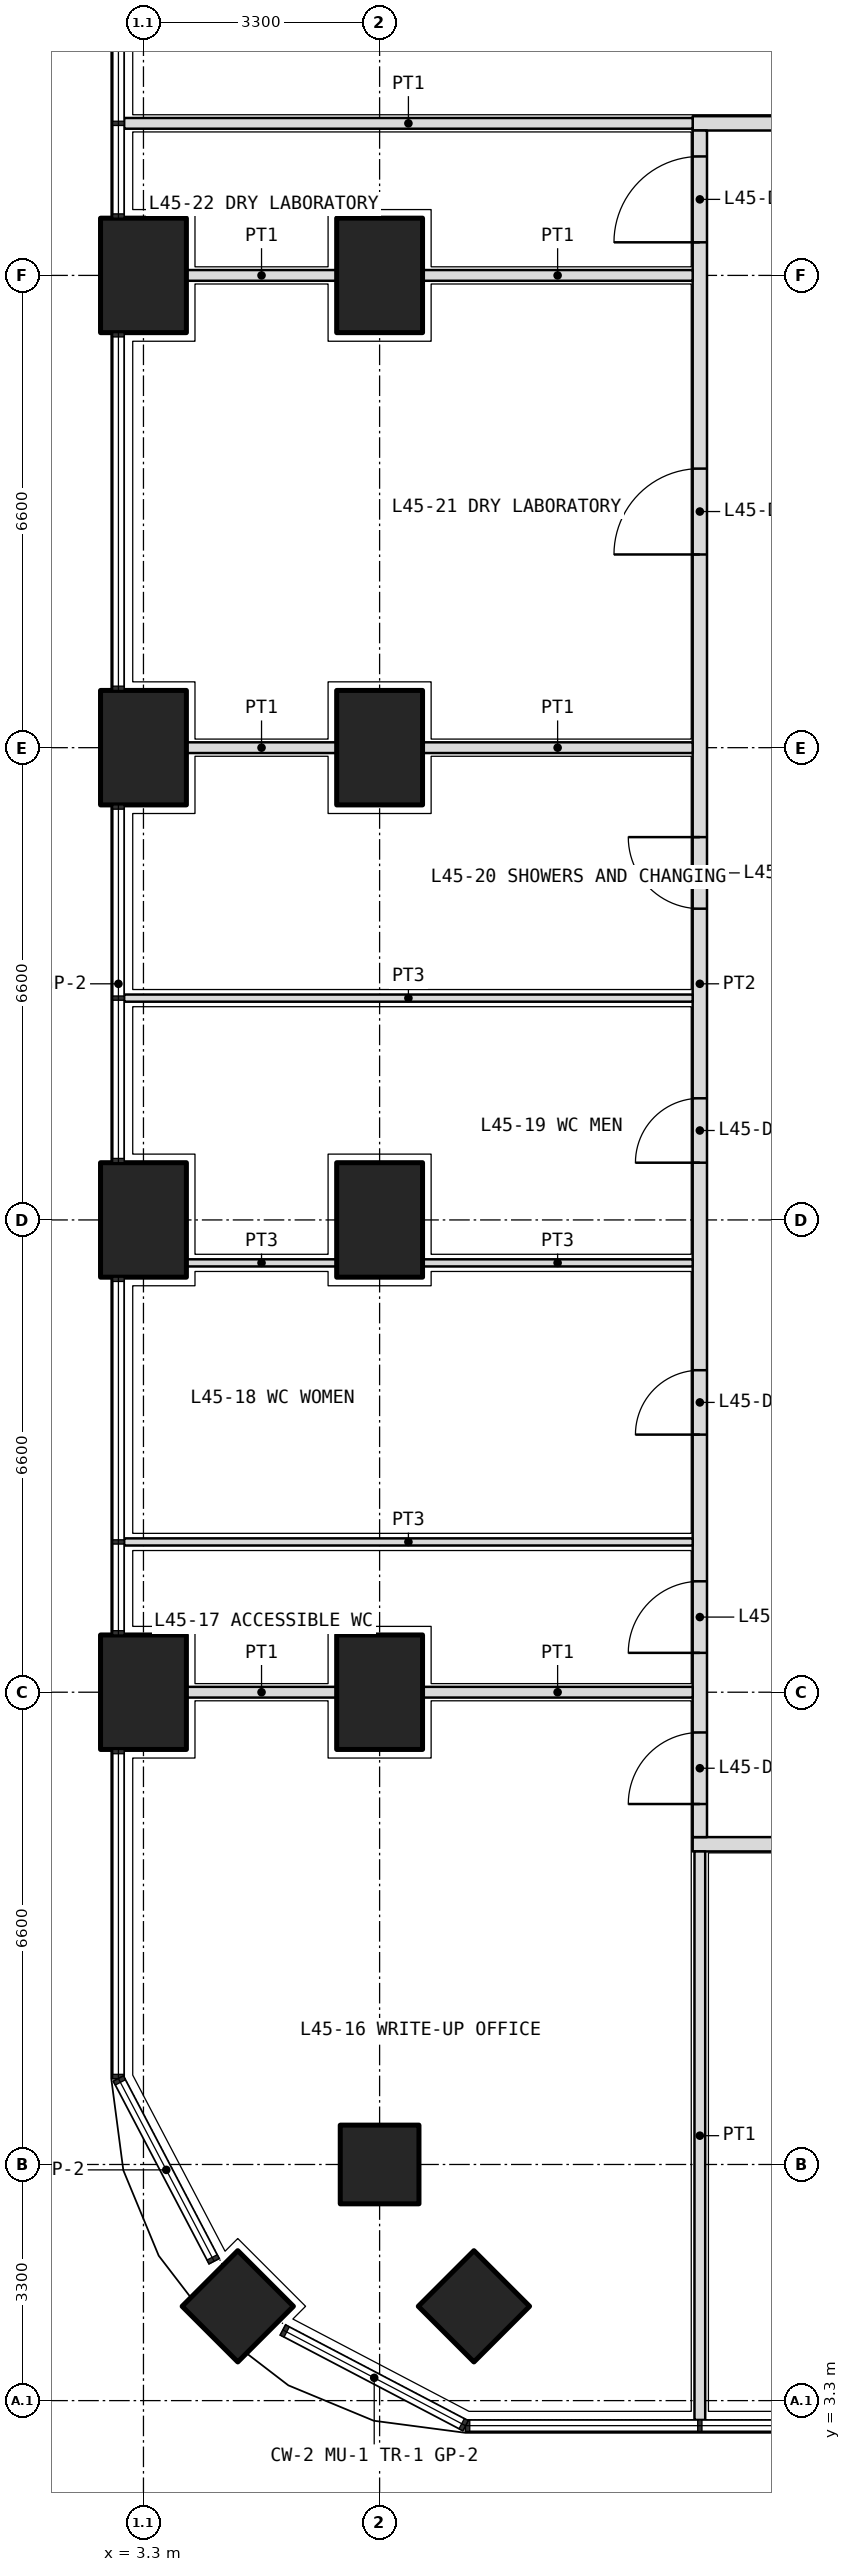
"""IFC4 building model, lengths in metres.
Left out: names, types, materials, properties, quantities, classifications, styles, units other than length and angle.
Written with IfcOpenShell. Run it as: python <this file> out.ifc"""

import sys

from ifc_helpers import new_model, si_unit, direction, frame, frame_2d, origin, origin_2d, place, context, subcontext, project, spatial, rectangle, extrude, element, fill, save


model = new_model("IFC4")
c1 = context("Model", 3, precision=1e-05, world=origin(), true_north=direction((0.0, 1.0)))
c2 = subcontext(c1, "Body", "Model", "MODEL_VIEW")
j1 = project(units=[si_unit("LENGTHUNIT", "METRE"), si_unit("PLANEANGLEUNIT", "RADIAN")], contexts=[c1])
p1 = place(None, origin())
s1 = spatial("IfcSite", under=j1, at=p1, CompositionType="ELEMENT")
p2 = place(p1, origin())
s2 = spatial("IfcBuilding", under=s1, at=p2, CompositionType="ELEMENT")
p3 = place(p2, frame((0.0, 0.0, 197.7)))
s3 = spatial("IfcBuildingStorey", under=s2, at=p3, CompositionType="ELEMENT", Elevation=197.7)
p4 = place(p3, frame((4.618, 4.618, 0.0), z_axis=(0.0, 0.0, 1.0), x_axis=(0.707106781187, 0.707106781187, 0.0)))
e1 = element("IfcColumn", 1, at=p4, inside=s3, PredefinedType="COLUMN", context=c2, shape_type="SweptSolid", body=[
    extrude(rectangle(XDim=1.1, YDim=1.1, at=origin_2d()), origin(), (0.0, 0.0, 1.0), 4.2),
])
for number, where, z_axis, x_axis in (
    (2, (3.3, 13.2, 0.0), (0.0, 0.0, 1.0), (0.0, 1.0, 0.0)),
    (3, (3.3, 19.8, 0.0), (0.0, 0.0, 1.0), (0.0, 1.0, 0.0)),
    (4, (3.3, 26.4, 0.0), (0.0, 0.0, 1.0), (0.0, 1.0, 0.0)),
    (5, (3.3, 33.0, 0.0), (0.0, 0.0, 1.0), (0.0, 1.0, 0.0)),
):
    element("IfcColumn", number, at=place(p3, frame(where, z_axis=z_axis, x_axis=x_axis)), inside=s3, PredefinedType="COLUMN", context=c2, shape_type="SweptSolid", body=[
        extrude(rectangle(XDim=1.6, YDim=1.2, at=origin_2d()), origin(), (0.0, 0.0, 1.0), 4.2),
    ])
for number, where, z_axis, x_axis in (
    (6, (6.6, 6.6, 0.0), (0.0, 0.0, 1.0), (1.0, 0.0, 0.0)),
    (7, (7.918, 4.618, 0.0), (0.0, 0.0, 1.0), (0.707, 0.707, 0.0)),
):
    element("IfcColumn", number, at=place(p3, frame(where, z_axis=z_axis, x_axis=x_axis)), inside=s3, PredefinedType="COLUMN", context=c2, shape_type="SweptSolid", body=[
        extrude(rectangle(XDim=1.1, YDim=1.1, at=origin_2d()), origin(), (0.0, 0.0, 1.0), 4.2),
    ])
for number, where, z_axis, x_axis in (
    (8, (6.6, 13.2, 0.0), (0.0, 0.0, 1.0), (0.0, 1.0, 0.0)),
    (9, (6.6, 19.8, 0.0), (0.0, 0.0, 1.0), (0.0, 1.0, 0.0)),
    (10, (6.6, 26.4, 0.0), (0.0, 0.0, 1.0), (0.0, 1.0, 0.0)),
    (11, (6.6, 33.0, 0.0), (0.0, 0.0, 1.0), (0.0, 1.0, 0.0)),
):
    element("IfcColumn", number, at=place(p3, frame(where, z_axis=z_axis, x_axis=x_axis)), inside=s3, PredefinedType="COLUMN", context=c2, shape_type="SweptSolid", body=[
        extrude(rectangle(XDim=1.6, YDim=1.2, at=origin_2d()), origin(), (0.0, 0.0, 1.0), 4.2),
    ])
p5 = place(p3, frame((10.975, 11.075, 0.0), z_axis=(0.0, 0.0, 1.0), x_axis=(1.0, 0.0, 0.0)))
e12 = element("IfcWall", 12, at=p5, inside=s3, PredefinedType="PARTITIONING", context=c2, shape_type="SweptSolid", body=[
    extrude(rectangle(XDim=30.85, YDim=0.2, at=frame_2d((15.425, 0.0))), origin(), (0.0, 0.0, 1.0), 2.85),
])
p6 = place(p5, frame((5.512, 0.0, 0.0)))
e13 = element("IfcOpeningElement", 13, at=p6, cuts=e12, PredefinedType="OPENING", context=c2, shape_type="SweptSolid", body=[
    extrude(rectangle(XDim=1.2, YDim=2.1, at=frame_2d((0.6, 1.05))), frame((0.0, 0.11, 0.0), z_axis=(0.0, -1.0, 0.0), x_axis=(1.0, 0.0, 0.0)), (0.0, 0.0, 1.0), 0.22),
])
p7 = place(p5, frame((13.375, 0.0, 0.0)))
e14 = element("IfcOpeningElement", 14, at=p7, cuts=e12, PredefinedType="OPENING", context=c2, shape_type="SweptSolid", body=[
    extrude(rectangle(XDim=1.0, YDim=2.1, at=frame_2d((0.5, 1.05))), frame((0.0, 0.11, 0.0), z_axis=(0.0, -1.0, 0.0), x_axis=(1.0, 0.0, 0.0)), (0.0, 0.0, 1.0), 0.22),
])
p8 = place(p5, frame((16.675, 0.0, 0.0)))
e15 = element("IfcOpeningElement", 15, at=p8, cuts=e12, PredefinedType="OPENING", context=c2, shape_type="SweptSolid", body=[
    extrude(rectangle(XDim=1.0, YDim=2.1, at=frame_2d((0.5, 1.05))), frame((0.0, 0.11, 0.0), z_axis=(0.0, -1.0, 0.0), x_axis=(1.0, 0.0, 0.0)), (0.0, 0.0, 1.0), 0.22),
])
p9 = place(p5, frame((24.238, 0.0, 0.0)))
e16 = element("IfcOpeningElement", 16, at=p9, cuts=e12, PredefinedType="OPENING", context=c2, shape_type="SweptSolid", body=[
    extrude(rectangle(XDim=1.0, YDim=2.1, at=frame_2d((0.5, 1.05))), frame((0.0, 0.11, 0.0), z_axis=(0.0, -1.0, 0.0), x_axis=(1.0, 0.0, 0.0)), (0.0, 0.0, 1.0), 0.22),
])
p10 = place(p3, frame((10.975, 35.125, 0.0), z_axis=(0.0, 0.0, 1.0), x_axis=(1.0, 0.0, 0.0)))
e17 = element("IfcWall", 17, at=p10, inside=s3, PredefinedType="PARTITIONING", context=c2, shape_type="SweptSolid", body=[
    extrude(rectangle(XDim=30.85, YDim=0.2, at=frame_2d((15.425, 0.0))), origin(), (0.0, 0.0, 1.0), 2.85),
])
p11 = place(p10, frame((2.212, 0.0, 0.0)))
e18 = element("IfcOpeningElement", 18, at=p11, cuts=e17, PredefinedType="OPENING", context=c2, shape_type="SweptSolid", body=[
    extrude(rectangle(XDim=1.2, YDim=2.1, at=frame_2d((0.6, 1.05))), frame((0.0, 0.11, 0.0), z_axis=(0.0, -1.0, 0.0), x_axis=(1.0, 0.0, 0.0)), (0.0, 0.0, 1.0), 0.22),
])
p12 = place(p10, frame((6.675, 0.0, 0.0)))
e19 = element("IfcOpeningElement", 19, at=p12, cuts=e17, PredefinedType="OPENING", context=c2, shape_type="SweptSolid", body=[
    extrude(rectangle(XDim=1.0, YDim=2.1, at=frame_2d((0.5, 1.05))), frame((0.0, 0.11, 0.0), z_axis=(0.0, -1.0, 0.0), x_axis=(1.0, 0.0, 0.0)), (0.0, 0.0, 1.0), 0.22),
])
p13 = place(p10, frame((14.925, 0.0, 0.0)))
e20 = element("IfcOpeningElement", 20, at=p13, cuts=e17, PredefinedType="OPENING", context=c2, shape_type="SweptSolid", body=[
    extrude(rectangle(XDim=1.0, YDim=2.1, at=frame_2d((0.5, 1.05))), frame((0.0, 0.11, 0.0), z_axis=(0.0, -1.0, 0.0), x_axis=(1.0, 0.0, 0.0)), (0.0, 0.0, 1.0), 0.22),
])
p14 = place(p10, frame((25.788, 0.0, 0.0)))
e21 = element("IfcOpeningElement", 21, at=p14, cuts=e17, PredefinedType="OPENING", context=c2, shape_type="SweptSolid", body=[
    extrude(rectangle(XDim=1.2, YDim=2.1, at=frame_2d((0.6, 1.05))), frame((0.0, 0.11, 0.0), z_axis=(0.0, -1.0, 0.0), x_axis=(1.0, 0.0, 0.0)), (0.0, 0.0, 1.0), 0.22),
])
p15 = place(p3, frame((11.075, 11.175, 0.0), z_axis=(0.0, 0.0, 1.0), x_axis=(0.0, 1.0, 0.0)))
e22 = element("IfcWall", 22, at=p15, inside=s3, PredefinedType="PARTITIONING", context=c2, shape_type="SweptSolid", body=[
    extrude(rectangle(XDim=23.85, YDim=0.2, at=frame_2d((11.925, 0.0))), origin(), (0.0, 0.0, 1.0), 2.85),
])
p16 = place(p15, frame((0.462, 0.0, 0.0)))
e23 = element("IfcOpeningElement", 23, at=p16, cuts=e22, PredefinedType="OPENING", context=c2, shape_type="SweptSolid", body=[
    extrude(rectangle(XDim=1.0, YDim=2.1, at=frame_2d((0.5, 1.05))), frame((0.0, 0.11, 0.0), z_axis=(0.0, -1.0, 0.0), x_axis=(1.0, 0.0, 0.0)), (0.0, 0.0, 1.0), 0.22),
])
p17 = place(p15, frame((2.575, 0.0, 0.0)))
e24 = element("IfcOpeningElement", 24, at=p17, cuts=e22, PredefinedType="OPENING", context=c2, shape_type="SweptSolid", body=[
    extrude(rectangle(XDim=1.0, YDim=2.1, at=frame_2d((0.5, 1.05))), frame((0.0, 0.11, 0.0), z_axis=(0.0, -1.0, 0.0), x_axis=(1.0, 0.0, 0.0)), (0.0, 0.0, 1.0), 0.22),
])
p18 = place(p15, frame((5.625, 0.0, 0.0)))
e25 = element("IfcOpeningElement", 25, at=p18, cuts=e22, PredefinedType="OPENING", context=c2, shape_type="SweptSolid", body=[
    extrude(rectangle(XDim=0.9, YDim=2.1, at=frame_2d((0.45, 1.05))), frame((0.0, 0.11, 0.0), z_axis=(0.0, -1.0, 0.0), x_axis=(1.0, 0.0, 0.0)), (0.0, 0.0, 1.0), 0.22),
])
p19 = place(p15, frame((9.425, 0.0, 0.0)))
e26 = element("IfcOpeningElement", 26, at=p19, cuts=e22, PredefinedType="OPENING", context=c2, shape_type="SweptSolid", body=[
    extrude(rectangle(XDim=0.9, YDim=2.1, at=frame_2d((0.45, 1.05))), frame((0.0, 0.11, 0.0), z_axis=(0.0, -1.0, 0.0), x_axis=(1.0, 0.0, 0.0)), (0.0, 0.0, 1.0), 0.22),
])
p20 = place(p15, frame((12.975, 0.0, 0.0)))
e27 = element("IfcOpeningElement", 27, at=p20, cuts=e22, PredefinedType="OPENING", context=c2, shape_type="SweptSolid", body=[
    extrude(rectangle(XDim=1.0, YDim=2.1, at=frame_2d((0.5, 1.05))), frame((0.0, 0.11, 0.0), z_axis=(0.0, -1.0, 0.0), x_axis=(1.0, 0.0, 0.0)), (0.0, 0.0, 1.0), 0.22),
])
p21 = place(p15, frame((17.925, 0.0, 0.0)))
e28 = element("IfcOpeningElement", 28, at=p21, cuts=e22, PredefinedType="OPENING", context=c2, shape_type="SweptSolid", body=[
    extrude(rectangle(XDim=1.2, YDim=2.1, at=frame_2d((0.6, 1.05))), frame((0.0, 0.11, 0.0), z_axis=(0.0, -1.0, 0.0), x_axis=(1.0, 0.0, 0.0)), (0.0, 0.0, 1.0), 0.22),
])
p22 = place(p15, frame((22.288, 0.0, 0.0)))
e29 = element("IfcOpeningElement", 29, at=p22, cuts=e22, PredefinedType="OPENING", context=c2, shape_type="SweptSolid", body=[
    extrude(rectangle(XDim=1.2, YDim=2.1, at=frame_2d((0.6, 1.05))), frame((0.0, 0.11, 0.0), z_axis=(0.0, -1.0, 0.0), x_axis=(1.0, 0.0, 0.0)), (0.0, 0.0, 1.0), 0.22),
])
for number, where, z_axis, x_axis in (
    (30, (11.075, 3.03, 0.0), (0.0, 0.0, 1.0), (0.0, 1.0, 0.0)),
    (31, (3.03, 35.125, 0.0), (0.0, 0.0, 1.0), (1.0, 0.0, 0.0)),
):
    element("IfcWall", number, at=place(p3, frame(where, z_axis=z_axis, x_axis=x_axis)), inside=s3, PredefinedType="PARTITIONING", context=c2, shape_type="SweptSolid", body=[
        extrude(rectangle(XDim=7.945, YDim=0.15, at=frame_2d((3.973, 0.0))), origin(), (0.0, 0.0, 1.0), 2.7),
    ])
p23 = place(p3, frame((3.03, 15.3, 0.0), z_axis=(0.0, 0.0, 1.0), x_axis=(1.0, 0.0, 0.0)))
e32 = element("IfcWall", 32, at=p23, inside=s3, PredefinedType="PARTITIONING", context=c2, shape_type="SweptSolid", body=[
    extrude(rectangle(XDim=7.945, YDim=0.1, at=frame_2d((3.973, 0.0))), origin(), (0.0, 0.0, 1.0), 2.7),
])
p24 = place(p3, frame((3.9, 19.2, 0.0), z_axis=(0.0, 0.0, 1.0), x_axis=(1.0, 0.0, 0.0)))
e33 = element("IfcWall", 33, at=p24, inside=s3, PredefinedType="PARTITIONING", context=c2, shape_type="SweptSolid", body=[
    extrude(rectangle(XDim=2.1, YDim=0.1, at=frame_2d((1.05, 0.0))), origin(), (0.0, 0.0, 1.0), 2.85),
])
p25 = place(p3, frame((7.2, 19.2, 0.0), z_axis=(0.0, 0.0, 1.0), x_axis=(1.0, 0.0, 0.0)))
e34 = element("IfcWall", 34, at=p25, inside=s3, PredefinedType="PARTITIONING", context=c2, shape_type="SweptSolid", body=[
    extrude(rectangle(XDim=3.775, YDim=0.1, at=frame_2d((1.888, 0.0))), origin(), (0.0, 0.0, 1.0), 2.85),
])
p26 = place(p3, frame((3.03, 22.9, 0.0), z_axis=(0.0, 0.0, 1.0), x_axis=(1.0, 0.0, 0.0)))
e35 = element("IfcWall", 35, at=p26, inside=s3, PredefinedType="PARTITIONING", context=c2, shape_type="SweptSolid", body=[
    extrude(rectangle(XDim=7.945, YDim=0.1, at=frame_2d((3.973, 0.0))), origin(), (0.0, 0.0, 1.0), 2.7),
])
p27 = place(p3, frame((3.9, 13.2, 0.0), z_axis=(0.0, 0.0, 1.0), x_axis=(1.0, 0.0, 0.0)))
e36 = element("IfcWall", 36, at=p27, inside=s3, PredefinedType="PARTITIONING", context=c2, shape_type="SweptSolid", body=[
    extrude(rectangle(XDim=2.1, YDim=0.15, at=frame_2d((1.05, 0.0))), origin(), (0.0, 0.0, 1.0), 2.85),
])
p28 = place(p3, frame((7.2, 13.2, 0.0), z_axis=(0.0, 0.0, 1.0), x_axis=(1.0, 0.0, 0.0)))
e37 = element("IfcWall", 37, at=p28, inside=s3, PredefinedType="PARTITIONING", context=c2, shape_type="SweptSolid", body=[
    extrude(rectangle(XDim=3.775, YDim=0.15, at=frame_2d((1.888, 0.0))), origin(), (0.0, 0.0, 1.0), 2.85),
])
p29 = place(p3, frame((3.9, 26.4, 0.0), z_axis=(0.0, 0.0, 1.0), x_axis=(1.0, 0.0, 0.0)))
e38 = element("IfcWall", 38, at=p29, inside=s3, PredefinedType="PARTITIONING", context=c2, shape_type="SweptSolid", body=[
    extrude(rectangle(XDim=2.1, YDim=0.15, at=frame_2d((1.05, 0.0))), origin(), (0.0, 0.0, 1.0), 2.85),
])
p30 = place(p3, frame((7.2, 26.4, 0.0), z_axis=(0.0, 0.0, 1.0), x_axis=(1.0, 0.0, 0.0)))
e39 = element("IfcWall", 39, at=p30, inside=s3, PredefinedType="PARTITIONING", context=c2, shape_type="SweptSolid", body=[
    extrude(rectangle(XDim=3.775, YDim=0.15, at=frame_2d((1.888, 0.0))), origin(), (0.0, 0.0, 1.0), 2.85),
])
p31 = place(p3, frame((3.9, 33.0, 0.0), z_axis=(0.0, 0.0, 1.0), x_axis=(1.0, 0.0, 0.0)))
e40 = element("IfcWall", 40, at=p31, inside=s3, PredefinedType="PARTITIONING", context=c2, shape_type="SweptSolid", body=[
    extrude(rectangle(XDim=2.1, YDim=0.15, at=frame_2d((1.05, 0.0))), origin(), (0.0, 0.0, 1.0), 2.85),
])
p32 = place(p3, frame((7.2, 33.0, 0.0), z_axis=(0.0, 0.0, 1.0), x_axis=(1.0, 0.0, 0.0)))
e41 = element("IfcWall", 41, at=p32, inside=s3, PredefinedType="PARTITIONING", context=c2, shape_type="SweptSolid", body=[
    extrude(rectangle(XDim=3.775, YDim=0.15, at=frame_2d((1.888, 0.0))), origin(), (0.0, 0.0, 1.0), 2.85),
])
p33 = place(p16, origin())
e42 = element("IfcDoor", 42, at=p33, inside=s3, OperationType="SINGLE_SWING_LEFT", PredefinedType="DOOR", context=c2, shape_type="SweptSolid", body=[
    extrude(rectangle(XDim=1.0, YDim=2.1, at=frame_2d((0.5, 1.05))), frame((0.0, 0.025, 0.0), z_axis=(0.0, -1.0, 0.0), x_axis=(1.0, 0.0, 0.0)), (0.0, 0.0, 1.0), 0.05),
])
fill(e23, e42)
p34 = place(p17, origin())
e43 = element("IfcDoor", 43, at=p34, inside=s3, OperationType="SINGLE_SWING_LEFT", PredefinedType="DOOR", context=c2, shape_type="SweptSolid", body=[
    extrude(rectangle(XDim=1.0, YDim=2.1, at=frame_2d((0.5, 1.05))), frame((0.0, 0.025, 0.0), z_axis=(0.0, -1.0, 0.0), x_axis=(1.0, 0.0, 0.0)), (0.0, 0.0, 1.0), 0.05),
])
fill(e24, e43)
p35 = place(p18, origin())
e44 = element("IfcDoor", 44, at=p35, inside=s3, OperationType="SINGLE_SWING_LEFT", PredefinedType="DOOR", context=c2, shape_type="SweptSolid", body=[
    extrude(rectangle(XDim=0.9, YDim=2.1, at=frame_2d((0.45, 1.05))), frame((0.0, 0.025, 0.0), z_axis=(0.0, -1.0, 0.0), x_axis=(1.0, 0.0, 0.0)), (0.0, 0.0, 1.0), 0.05),
])
fill(e25, e44)
p36 = place(p19, origin())
e45 = element("IfcDoor", 45, at=p36, inside=s3, OperationType="SINGLE_SWING_LEFT", PredefinedType="DOOR", context=c2, shape_type="SweptSolid", body=[
    extrude(rectangle(XDim=0.9, YDim=2.1, at=frame_2d((0.45, 1.05))), frame((0.0, 0.025, 0.0), z_axis=(0.0, -1.0, 0.0), x_axis=(1.0, 0.0, 0.0)), (0.0, 0.0, 1.0), 0.05),
])
fill(e26, e45)
p37 = place(p20, origin())
e46 = element("IfcDoor", 46, at=p37, inside=s3, OperationType="SINGLE_SWING_RIGHT", PredefinedType="DOOR", context=c2, shape_type="SweptSolid", body=[
    extrude(rectangle(XDim=1.0, YDim=2.1, at=frame_2d((0.5, 1.05))), frame((0.0, 0.025, 0.0), z_axis=(0.0, -1.0, 0.0), x_axis=(1.0, 0.0, 0.0)), (0.0, 0.0, 1.0), 0.05),
])
fill(e27, e46)
p38 = place(p21, origin())
e47 = element("IfcDoor", 47, at=p38, inside=s3, OperationType="DOUBLE_DOOR_SINGLE_SWING", PredefinedType="DOOR", context=c2, shape_type="SweptSolid", body=[
    extrude(rectangle(XDim=1.2, YDim=2.1, at=frame_2d((0.6, 1.05))), frame((0.0, 0.025, 0.0), z_axis=(0.0, -1.0, 0.0), x_axis=(1.0, 0.0, 0.0)), (0.0, 0.0, 1.0), 0.05),
])
fill(e28, e47)
p39 = place(p22, origin())
e48 = element("IfcDoor", 48, at=p39, inside=s3, OperationType="DOUBLE_DOOR_SINGLE_SWING", PredefinedType="DOOR", context=c2, shape_type="SweptSolid", body=[
    extrude(rectangle(XDim=1.2, YDim=2.1, at=frame_2d((0.6, 1.05))), frame((0.0, 0.025, 0.0), z_axis=(0.0, -1.0, 0.0), x_axis=(1.0, 0.0, 0.0)), (0.0, 0.0, 1.0), 0.05),
])
fill(e29, e48)
save(model, sys.argv[1])
